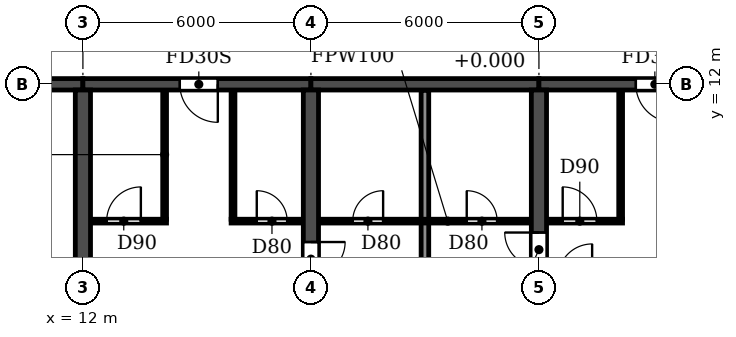
"""IFC4 building model, lengths in metres.
Left out: names, types, materials, properties, quantities, classifications, styles, units other than length and angle.
Written with IfcOpenShell. Run it as: python <this file> out.ifc"""

import sys

from ifc_helpers import new_model, si_unit, direction, frame, frame_2d, origin, place, context, subcontext, project, spatial, rectangle, extrude, element, fill, save


model = new_model("IFC4")
c1 = context("Model", 3, precision=1e-05, world=origin(), true_north=direction((0.0, 1.0)))
c2 = subcontext(c1, "Body", "Model", "MODEL_VIEW")
j1 = project(units=[si_unit("LENGTHUNIT", "METRE"), si_unit("PLANEANGLEUNIT", "RADIAN")], contexts=[c1])
p1 = place(None, origin())
s1 = spatial("IfcSite", under=j1, at=p1, CompositionType="ELEMENT")
p2 = place(p1, origin())
s2 = spatial("IfcBuilding", under=s1, at=p2, CompositionType="ELEMENT")
p3 = place(p2, frame((0.0, 0.0, 63.0)))
s3 = spatial("IfcBuildingStorey", under=s2, at=p3, CompositionType="ELEMENT", Elevation=63.0)
p4 = place(p3, frame((12.0, 0.2, 0.0), z_axis=(0.0, 0.0, 1.0), x_axis=(0.0, 1.0, 0.0)))
e1 = element("IfcWall", 1, at=p4, inside=s3, PredefinedType="SHEAR", context=c2, shape_type="SweptSolid", body=[
    extrude(rectangle(XDim=11.65, YDim=0.4, at=frame_2d((5.825, 0.0))), origin(), (0.0, 0.0, 1.0), 2.95),
])
p5 = place(p3, frame((18.0, 0.2, 0.0), z_axis=(0.0, 0.0, 1.0), x_axis=(0.0, 1.0, 0.0)))
e2 = element("IfcWall", 2, at=p5, inside=s3, PredefinedType="SHEAR", context=c2, shape_type="SweptSolid", body=[
    extrude(rectangle(XDim=11.65, YDim=0.4, at=frame_2d((5.825, 0.0))), origin(), (0.0, 0.0, 1.0), 2.95),
])
p6 = place(p5, frame((6.75, 0.0, 0.0)))
e3 = element("IfcOpeningElement", 3, at=p6, cuts=e2, PredefinedType="OPENING", context=c2, shape_type="SweptSolid", body=[
    extrude(rectangle(XDim=0.9, YDim=2.1, at=frame_2d((0.45, 1.05))), frame((0.0, 0.21, 0.0), z_axis=(0.0, -1.0, 0.0), x_axis=(1.0, 0.0, 0.0)), (0.0, 0.0, 1.0), 0.42),
])
p7 = place(p3, frame((24.0, 0.2, 0.0), z_axis=(0.0, 0.0, 1.0), x_axis=(0.0, 1.0, 0.0)))
e4 = element("IfcWall", 4, at=p7, inside=s3, PredefinedType="SHEAR", context=c2, shape_type="SweptSolid", body=[
    extrude(rectangle(XDim=11.65, YDim=0.4, at=frame_2d((5.825, 0.0))), origin(), (0.0, 0.0, 1.0), 2.95),
])
p8 = place(p7, frame((7.0, 0.0, 0.0)))
e5 = element("IfcOpeningElement", 5, at=p8, cuts=e4, PredefinedType="OPENING", context=c2, shape_type="SweptSolid", body=[
    extrude(rectangle(XDim=0.9, YDim=2.1, at=frame_2d((0.45, 1.05))), frame((0.0, 0.21, 0.0), z_axis=(0.0, -1.0, 0.0), x_axis=(1.0, 0.0, 0.0)), (0.0, 0.0, 1.0), 0.42),
])
p9 = place(p3, frame((6.2, 12.0, 0.0), z_axis=(0.0, 0.0, 1.0), x_axis=(1.0, 0.0, 0.0)))
e6 = element("IfcWall", 6, at=p9, inside=s3, PredefinedType="SHEAR", context=c2, shape_type="SweptSolid", body=[
    extrude(rectangle(XDim=5.8, YDim=0.3, at=frame_2d((2.9, 0.0))), origin(), (0.0, 0.0, 1.0), 2.35),
])
p10 = place(p9, frame((2.3, 0.0, 0.0)))
e7 = element("IfcOpeningElement", 7, at=p10, cuts=e6, PredefinedType="OPENING", context=c2, shape_type="SweptSolid", body=[
    extrude(rectangle(XDim=1.0, YDim=2.1, at=frame_2d((0.5, 1.05))), frame((0.0, 0.16, 0.0), z_axis=(0.0, -1.0, 0.0), x_axis=(1.0, 0.0, 0.0)), (0.0, 0.0, 1.0), 0.32),
])
p11 = place(p3, frame((12.0, 12.0, 0.0), z_axis=(0.0, 0.0, 1.0), x_axis=(1.0, 0.0, 0.0)))
e8 = element("IfcWall", 8, at=p11, inside=s3, PredefinedType="SHEAR", context=c2, shape_type="SweptSolid", body=[
    extrude(rectangle(XDim=6.0, YDim=0.3, at=frame_2d((3.0, 0.0))), origin(), (0.0, 0.0, 1.0), 2.35),
])
p12 = place(p11, frame((2.55, 0.0, 0.0)))
e9 = element("IfcOpeningElement", 9, at=p12, cuts=e8, PredefinedType="OPENING", context=c2, shape_type="SweptSolid", body=[
    extrude(rectangle(XDim=1.0, YDim=2.1, at=frame_2d((0.5, 1.05))), frame((0.0, 0.16, 0.0), z_axis=(0.0, -1.0, 0.0), x_axis=(1.0, 0.0, 0.0)), (0.0, 0.0, 1.0), 0.32),
])
p13 = place(p3, frame((18.0, 12.0, 0.0), z_axis=(0.0, 0.0, 1.0), x_axis=(1.0, 0.0, 0.0)))
e10 = element("IfcWall", 10, at=p13, inside=s3, PredefinedType="SHEAR", context=c2, shape_type="SweptSolid", body=[
    extrude(rectangle(XDim=6.0, YDim=0.3, at=frame_2d((3.0, 0.0))), origin(), (0.0, 0.0, 1.0), 2.35),
])
p14 = place(p3, frame((24.0, 12.0, 0.0), z_axis=(0.0, 0.0, 1.0), x_axis=(1.0, 0.0, 0.0)))
e11 = element("IfcWall", 11, at=p14, inside=s3, PredefinedType="SHEAR", context=c2, shape_type="SweptSolid", body=[
    extrude(rectangle(XDim=6.0, YDim=0.3, at=frame_2d((3.0, 0.0))), origin(), (0.0, 0.0, 1.0), 2.35),
])
p15 = place(p14, frame((2.55, 0.0, 0.0)))
e12 = element("IfcOpeningElement", 12, at=p15, cuts=e11, PredefinedType="OPENING", context=c2, shape_type="SweptSolid", body=[
    extrude(rectangle(XDim=1.0, YDim=2.1, at=frame_2d((0.5, 1.05))), frame((0.0, 0.16, 0.0), z_axis=(0.0, -1.0, 0.0), x_axis=(1.0, 0.0, 0.0)), (0.0, 0.0, 1.0), 0.32),
])
p16 = place(p3, frame((21.0, 0.06, 0.0), z_axis=(0.0, 0.0, 1.0), x_axis=(0.0, 1.0, 0.0)))
e13 = element("IfcWall", 13, at=p16, inside=s3, PredefinedType="PARTITIONING", context=c2, shape_type="SweptSolid", body=[
    extrude(rectangle(XDim=11.78, YDim=0.2, at=frame_2d((5.89, 0.0))), origin(), (0.0, 0.0, 1.0), 2.95),
])
p17 = place(p3, frame((12.21, 8.4, 0.0), z_axis=(0.0, 0.0, 1.0), x_axis=(1.0, 0.0, 0.0)))
e14 = element("IfcWall", 14, at=p17, inside=s3, PredefinedType="PARTITIONING", context=c2, shape_type="SweptSolid", body=[
    extrude(rectangle(XDim=1.99, YDim=0.1, at=frame_2d((0.995, 0.0))), origin(), (0.0, 0.0, 1.0), 2.95),
])
p18 = place(p17, frame((0.415, 0.0, 0.0)))
e15 = element("IfcOpeningElement", 15, at=p18, cuts=e14, PredefinedType="OPENING", context=c2, shape_type="SweptSolid", body=[
    extrude(rectangle(XDim=0.9, YDim=2.1, at=frame_2d((0.45, 1.05))), frame((0.0, 0.06, 0.0), z_axis=(0.0, -1.0, 0.0), x_axis=(1.0, 0.0, 0.0)), (0.0, 0.0, 1.0), 0.12),
])
p19 = place(p3, frame((15.9, 8.4, 0.0), z_axis=(0.0, 0.0, 1.0), x_axis=(1.0, 0.0, 0.0)))
e16 = element("IfcWall", 16, at=p19, inside=s3, PredefinedType="PARTITIONING", context=c2, shape_type="SweptSolid", body=[
    extrude(rectangle(XDim=1.89, YDim=0.1, at=frame_2d((0.945, 0.0))), origin(), (0.0, 0.0, 1.0), 2.95),
])
p20 = place(p19, frame((0.675, 0.0, 0.0)))
e17 = element("IfcOpeningElement", 17, at=p20, cuts=e16, PredefinedType="OPENING", context=c2, shape_type="SweptSolid", body=[
    extrude(rectangle(XDim=0.8, YDim=2.1, at=frame_2d((0.4, 1.05))), frame((0.0, 0.06, 0.0), z_axis=(0.0, -1.0, 0.0), x_axis=(1.0, 0.0, 0.0)), (0.0, 0.0, 1.0), 0.12),
])
p21 = place(p3, frame((18.21, 8.4, 0.0), z_axis=(0.0, 0.0, 1.0), x_axis=(1.0, 0.0, 0.0)))
e18 = element("IfcWall", 18, at=p21, inside=s3, PredefinedType="PARTITIONING", context=c2, shape_type="SweptSolid", body=[
    extrude(rectangle(XDim=5.58, YDim=0.1, at=frame_2d((2.79, 0.0))), origin(), (0.0, 0.0, 1.0), 2.95),
])
p22 = place(p21, frame((0.89, 0.0, 0.0)))
e19 = element("IfcOpeningElement", 19, at=p22, cuts=e18, PredefinedType="OPENING", context=c2, shape_type="SweptSolid", body=[
    extrude(rectangle(XDim=0.8, YDim=2.1, at=frame_2d((0.4, 1.05))), frame((0.0, 0.06, 0.0), z_axis=(0.0, -1.0, 0.0), x_axis=(1.0, 0.0, 0.0)), (0.0, 0.0, 1.0), 0.12),
])
p23 = place(p21, frame((3.89, 0.0, 0.0)))
e20 = element("IfcOpeningElement", 20, at=p23, cuts=e18, PredefinedType="OPENING", context=c2, shape_type="SweptSolid", body=[
    extrude(rectangle(XDim=0.8, YDim=2.1, at=frame_2d((0.4, 1.05))), frame((0.0, 0.06, 0.0), z_axis=(0.0, -1.0, 0.0), x_axis=(1.0, 0.0, 0.0)), (0.0, 0.0, 1.0), 0.12),
])
p24 = place(p3, frame((24.21, 8.4, 0.0), z_axis=(0.0, 0.0, 1.0), x_axis=(1.0, 0.0, 0.0)))
e21 = element("IfcWall", 21, at=p24, inside=s3, PredefinedType="PARTITIONING", context=c2, shape_type="SweptSolid", body=[
    extrude(rectangle(XDim=1.99, YDim=0.1, at=frame_2d((0.995, 0.0))), origin(), (0.0, 0.0, 1.0), 2.95),
])
p25 = place(p24, frame((0.415, 0.0, 0.0)))
e22 = element("IfcOpeningElement", 22, at=p25, cuts=e21, PredefinedType="OPENING", context=c2, shape_type="SweptSolid", body=[
    extrude(rectangle(XDim=0.9, YDim=2.1, at=frame_2d((0.45, 1.05))), frame((0.0, 0.06, 0.0), z_axis=(0.0, -1.0, 0.0), x_axis=(1.0, 0.0, 0.0)), (0.0, 0.0, 1.0), 0.12),
])
for number, where, z_axis, x_axis in (
    (23, (14.15, 8.45, 0.0), (0.0, 0.0, 1.0), (0.0, 1.0, 0.0)),
    (24, (15.95, 8.45, 0.0), (0.0, 0.0, 1.0), (0.0, 1.0, 0.0)),
    (25, (26.15, 8.45, 0.0), (0.0, 0.0, 1.0), (0.0, 1.0, 0.0)),
):
    element("IfcWall", number, at=place(p3, frame(where, z_axis=z_axis, x_axis=x_axis)), inside=s3, PredefinedType="PARTITIONING", context=c2, shape_type="SweptSolid", body=[
        extrude(rectangle(XDim=3.39, YDim=0.1, at=frame_2d((1.695, 0.0))), origin(), (0.0, 0.0, 1.0), 2.95),
    ])
p26 = place(p22, origin())
e26 = element("IfcDoor", 26, at=p26, inside=s3, OperationType="SINGLE_SWING_RIGHT", PredefinedType="DOOR", context=c2, shape_type="SweptSolid", body=[
    extrude(rectangle(XDim=0.8, YDim=2.1, at=frame_2d((0.4, 1.05))), frame((0.0, 0.025, 0.0), z_axis=(0.0, -1.0, 0.0), x_axis=(1.0, 0.0, 0.0)), (0.0, 0.0, 1.0), 0.05),
])
fill(e19, e26)
p27 = place(p18, origin())
e27 = element("IfcDoor", 27, at=p27, inside=s3, OperationType="SINGLE_SWING_RIGHT", PredefinedType="DOOR", context=c2, shape_type="SweptSolid", body=[
    extrude(rectangle(XDim=0.9, YDim=2.1, at=frame_2d((0.45, 1.05))), frame((0.0, 0.025, 0.0), z_axis=(0.0, -1.0, 0.0), x_axis=(1.0, 0.0, 0.0)), (0.0, 0.0, 1.0), 0.05),
])
fill(e15, e27)
p28 = place(p12, frame((1.0, 0.0, 0.0), z_axis=(0.0, 0.0, 1.0), x_axis=(-1.0, 0.0, 0.0)))
e28 = element("IfcDoor", 28, at=p28, inside=s3, OperationType="SINGLE_SWING_LEFT", PredefinedType="DOOR", context=c2, shape_type="SweptSolid", body=[
    extrude(rectangle(XDim=1.0, YDim=2.1, at=frame_2d((0.5, 1.05))), frame((0.0, 0.025, 0.0), z_axis=(0.0, -1.0, 0.0), x_axis=(1.0, 0.0, 0.0)), (0.0, 0.0, 1.0), 0.05),
])
fill(e9, e28)
p29 = place(p20, origin())
e29 = element("IfcDoor", 29, at=p29, inside=s3, OperationType="SINGLE_SWING_LEFT", PredefinedType="DOOR", context=c2, shape_type="SweptSolid", body=[
    extrude(rectangle(XDim=0.8, YDim=2.1, at=frame_2d((0.4, 1.05))), frame((0.0, 0.025, 0.0), z_axis=(0.0, -1.0, 0.0), x_axis=(1.0, 0.0, 0.0)), (0.0, 0.0, 1.0), 0.05),
])
fill(e17, e29)
p30 = place(p6, frame((0.9, 0.0, 0.0), z_axis=(0.0, 0.0, 1.0), x_axis=(-1.0, 0.0, 0.0)))
e30 = element("IfcDoor", 30, at=p30, inside=s3, OperationType="SINGLE_SWING_LEFT", PredefinedType="DOOR", context=c2, shape_type="SweptSolid", body=[
    extrude(rectangle(XDim=0.9, YDim=2.1, at=frame_2d((0.45, 1.05))), frame((0.0, 0.025, 0.0), z_axis=(0.0, -1.0, 0.0), x_axis=(1.0, 0.0, 0.0)), (0.0, 0.0, 1.0), 0.05),
])
fill(e3, e30)
p31 = place(p23, origin())
e31 = element("IfcDoor", 31, at=p31, inside=s3, OperationType="SINGLE_SWING_LEFT", PredefinedType="DOOR", context=c2, shape_type="SweptSolid", body=[
    extrude(rectangle(XDim=0.8, YDim=2.1, at=frame_2d((0.4, 1.05))), frame((0.0, 0.025, 0.0), z_axis=(0.0, -1.0, 0.0), x_axis=(1.0, 0.0, 0.0)), (0.0, 0.0, 1.0), 0.05),
])
fill(e20, e31)
p32 = place(p8, origin())
e32 = element("IfcDoor", 32, at=p32, inside=s3, OperationType="SINGLE_SWING_RIGHT", PredefinedType="DOOR", context=c2, shape_type="SweptSolid", body=[
    extrude(rectangle(XDim=0.9, YDim=2.1, at=frame_2d((0.45, 1.05))), frame((0.0, 0.025, 0.0), z_axis=(0.0, -1.0, 0.0), x_axis=(1.0, 0.0, 0.0)), (0.0, 0.0, 1.0), 0.05),
])
fill(e5, e32)
p33 = place(p25, origin())
e33 = element("IfcDoor", 33, at=p33, inside=s3, OperationType="SINGLE_SWING_LEFT", PredefinedType="DOOR", context=c2, shape_type="SweptSolid", body=[
    extrude(rectangle(XDim=0.9, YDim=2.1, at=frame_2d((0.45, 1.05))), frame((0.0, 0.025, 0.0), z_axis=(0.0, -1.0, 0.0), x_axis=(1.0, 0.0, 0.0)), (0.0, 0.0, 1.0), 0.05),
])
fill(e22, e33)
p34 = place(p15, frame((1.0, 0.0, 0.0), z_axis=(0.0, 0.0, 1.0), x_axis=(-1.0, 0.0, 0.0)))
e34 = element("IfcDoor", 34, at=p34, inside=s3, OperationType="SINGLE_SWING_LEFT", PredefinedType="DOOR", context=c2, shape_type="SweptSolid", body=[
    extrude(rectangle(XDim=1.0, YDim=2.1, at=frame_2d((0.5, 1.05))), frame((0.0, 0.025, 0.0), z_axis=(0.0, -1.0, 0.0), x_axis=(1.0, 0.0, 0.0)), (0.0, 0.0, 1.0), 0.05),
])
fill(e12, e34)
save(model, sys.argv[1])
